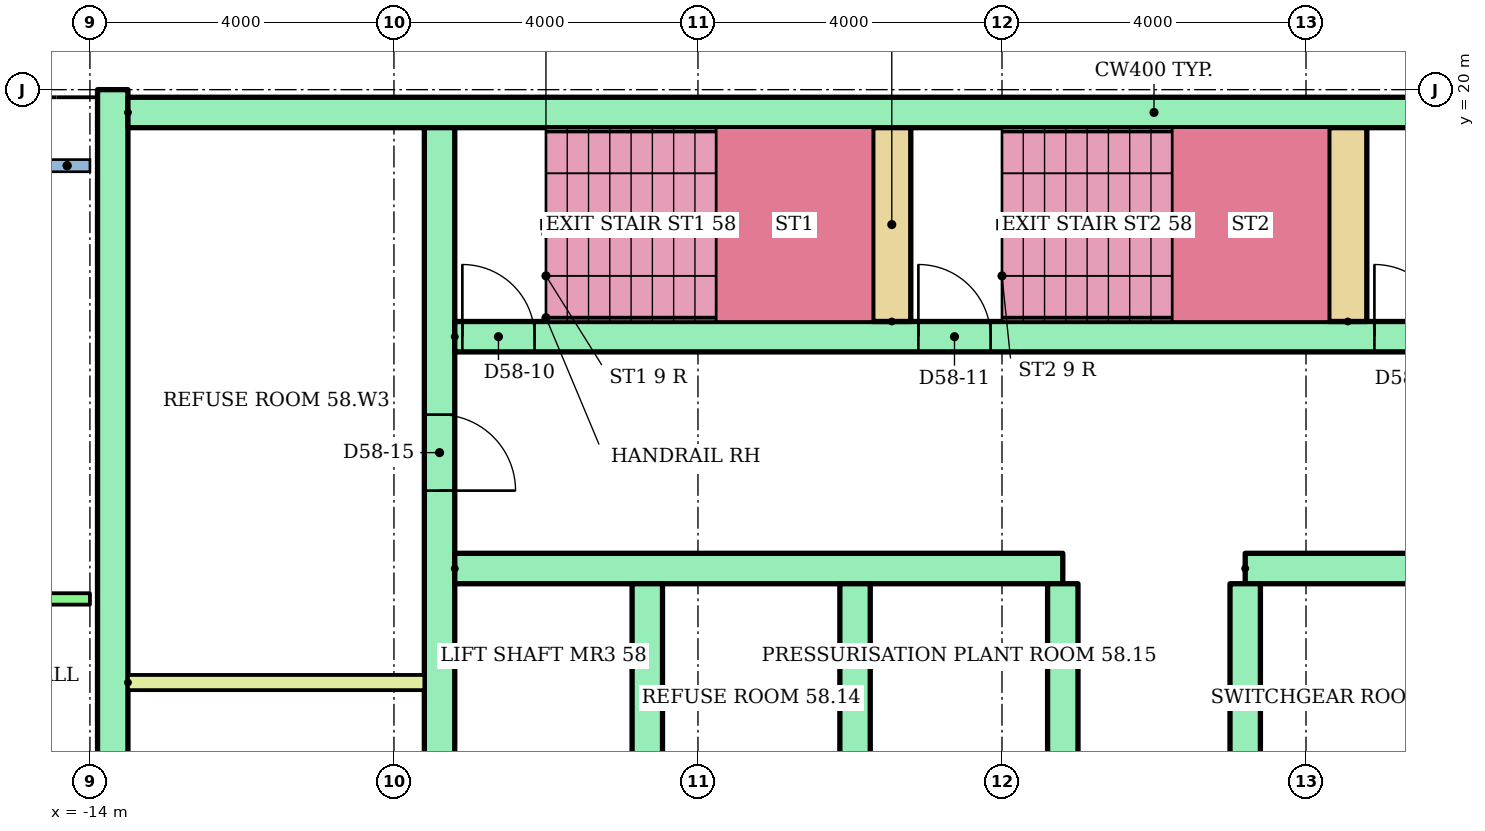
"""IFC4 building model, lengths in metres.
Left out: names, types, materials, properties, quantities, classifications, styles, units other than length and angle.
Written with IfcOpenShell. Run it as: python <this file> out.ifc"""

import sys

from ifc_helpers import new_model, si_unit, direction, frame, frame_2d, origin, place, context, subcontext, project, spatial, rectangle, extrude, element, fill, save


model = new_model("IFC4")
c1 = context("Model", 3, precision=1e-05, world=origin(), true_north=direction((0.0, 1.0)))
c2 = subcontext(c1, "Body", "Model", "MODEL_VIEW")
j1 = project(units=[si_unit("LENGTHUNIT", "METRE"), si_unit("PLANEANGLEUNIT", "RADIAN")], contexts=[c1])
p1 = place(None, origin())
s1 = spatial("IfcSite", under=j1, at=p1, CompositionType="ELEMENT")
p2 = place(p1, origin())
s2 = spatial("IfcBuilding", under=s1, at=p2, CompositionType="ELEMENT")
p3 = place(p2, frame((0.0, 0.0, 223.6)))
s3 = spatial("IfcBuildingStorey", under=s2, at=p3, CompositionType="ELEMENT", Elevation=223.6)
p4 = place(p3, frame((-13.7, 3.0, 0.0), z_axis=(0.0, 0.0, 1.0), x_axis=(0.0, 1.0, 0.0)))
e1 = element("IfcWall", 1, at=p4, inside=s3, PredefinedType="SHEAR", context=c2, shape_type="SweptSolid", body=[
    extrude(rectangle(XDim=17.0, YDim=0.4, at=frame_2d((8.5, 0.0))), origin(), (0.0, 0.0, 1.0), 2.92),
])
p5 = place(p3, frame((-13.5, 19.7, 0.0)))
e2 = element("IfcWall", 2, at=p5, inside=s3, PredefinedType="SHEAR", context=c2, shape_type="SweptSolid", body=[
    extrude(rectangle(XDim=27.0, YDim=0.4, at=frame_2d((13.5, 0.0))), origin(), (0.0, 0.0, 1.0), 2.92),
])
p6 = place(p3, frame((-9.4, 6.8, 0.0), z_axis=(0.0, 0.0, 1.0), x_axis=(0.0, 1.0, 0.0)))
e3 = element("IfcWall", 3, at=p6, inside=s3, PredefinedType="SHEAR", context=c2, shape_type="SweptSolid", body=[
    extrude(rectangle(XDim=12.7, YDim=0.4, at=frame_2d((6.35, 0.0))), origin(), (0.0, 0.0, 1.0), 2.92),
])
p7 = place(p6, frame((0.3, 0.0, 0.0)))
e4 = element("IfcOpeningElement", 4, at=p7, cuts=e3, PredefinedType="OPENING", context=c2, shape_type="SweptSolid", body=[
    extrude(rectangle(XDim=1.0, YDim=2.1, at=frame_2d((0.5, 1.05))), frame((0.0, 0.21, 0.0), z_axis=(0.0, -1.0, 0.0), x_axis=(1.0, 0.0, 0.0)), (0.0, 0.0, 1.0), 0.42),
])
p8 = place(p6, frame((2.05, 0.0, 0.0)))
e5 = element("IfcOpeningElement", 5, at=p8, cuts=e3, PredefinedType="OPENING", context=c2, shape_type="SweptSolid", body=[
    extrude(rectangle(XDim=1.0, YDim=2.1, at=frame_2d((0.5, 1.05))), frame((0.0, 0.21, 0.0), z_axis=(0.0, -1.0, 0.0), x_axis=(1.0, 0.0, 0.0)), (0.0, 0.0, 1.0), 0.42),
])
p9 = place(p6, frame((7.925, 0.0, 0.0)))
e6 = element("IfcOpeningElement", 6, at=p9, cuts=e3, PredefinedType="OPENING", context=c2, shape_type="SweptSolid", body=[
    extrude(rectangle(XDim=1.0, YDim=2.1, at=frame_2d((0.5, 1.05))), frame((0.0, 0.21, 0.0), z_axis=(0.0, -1.0, 0.0), x_axis=(1.0, 0.0, 0.0)), (0.0, 0.0, 1.0), 0.42),
])
for number, where in (
    (7, (-9.2, 13.7, 0.0)),
    (8, (1.2, 13.7, 0.0)),
):
    element("IfcWall", number, at=place(p3, frame(where)), inside=s3, PredefinedType="SHEAR", context=c2, shape_type="SweptSolid", body=[
        extrude(rectangle(XDim=8.0, YDim=0.4, at=frame_2d((4.0, 0.0))), origin(), (0.0, 0.0, 1.0), 2.92),
    ])
for number, where, z_axis, x_axis in (
    (9, (-6.667, 10.5, 0.0), (0.0, 0.0, 1.0), (0.0, 1.0, 0.0)),
    (10, (-3.933, 10.5, 0.0), (0.0, 0.0, 1.0), (0.0, 1.0, 0.0)),
    (11, (-1.2, 10.5, 0.0), (0.0, 0.0, 1.0), (0.0, 1.0, 0.0)),
    (12, (1.2, 10.5, 0.0), (0.0, 0.0, 1.0), (0.0, 1.0, 0.0)),
):
    element("IfcWall", number, at=place(p3, frame(where, z_axis=z_axis, x_axis=x_axis)), inside=s3, PredefinedType="SHEAR", context=c2, shape_type="SweptSolid", body=[
        extrude(rectangle(XDim=3.0, YDim=0.4, at=frame_2d((1.5, 0.0))), origin(), (0.0, 0.0, 1.0), 2.92),
    ])
p10 = place(p3, frame((-9.2, 16.75, 0.0)))
e13 = element("IfcWall", 13, at=p10, inside=s3, PredefinedType="SHEAR", context=c2, shape_type="SweptSolid", body=[
    extrude(rectangle(XDim=18.4, YDim=0.4, at=frame_2d((9.2, 0.0))), origin(), (0.0, 0.0, 1.0), 2.92),
])
p11 = place(p10, frame((0.1, 0.0, 0.0)))
e14 = element("IfcOpeningElement", 14, at=p11, cuts=e13, PredefinedType="OPENING", context=c2, shape_type="SweptSolid", body=[
    extrude(rectangle(XDim=0.95, YDim=2.1, at=frame_2d((0.475, 1.05))), frame((0.0, 0.21, 0.0), z_axis=(0.0, -1.0, 0.0), x_axis=(1.0, 0.0, 0.0)), (0.0, 0.0, 1.0), 0.42),
])
p12 = place(p10, frame((6.1, 0.0, 0.0)))
e15 = element("IfcOpeningElement", 15, at=p12, cuts=e13, PredefinedType="OPENING", context=c2, shape_type="SweptSolid", body=[
    extrude(rectangle(XDim=0.95, YDim=2.1, at=frame_2d((0.475, 1.05))), frame((0.0, 0.21, 0.0), z_axis=(0.0, -1.0, 0.0), x_axis=(1.0, 0.0, 0.0)), (0.0, 0.0, 1.0), 0.42),
])
p13 = place(p10, frame((12.1, 0.0, 0.0)))
e16 = element("IfcOpeningElement", 16, at=p13, cuts=e13, PredefinedType="OPENING", context=c2, shape_type="SweptSolid", body=[
    extrude(rectangle(XDim=0.95, YDim=2.1, at=frame_2d((0.475, 1.05))), frame((0.0, 0.21, 0.0), z_axis=(0.0, -1.0, 0.0), x_axis=(1.0, 0.0, 0.0)), (0.0, 0.0, 1.0), 0.42),
])
for number, where, z_axis, x_axis in (
    (17, (-3.45, 16.95, 0.0), (0.0, 0.0, 1.0), (0.0, 1.0, 0.0)),
    (18, (2.55, 16.95, 0.0), (0.0, 0.0, 1.0), (0.0, 1.0, 0.0)),
):
    element("IfcWall", number, at=place(p3, frame(where, z_axis=z_axis, x_axis=x_axis)), inside=s3, PredefinedType="SHEAR", context=c2, shape_type="SweptSolid", body=[
        extrude(rectangle(XDim=2.55, YDim=0.5, at=frame_2d((1.275, 0.0))), origin(), (0.0, 0.0, 1.0), 2.92),
    ])
p14 = place(p3, frame((-13.5, 12.2, 0.0)))
e19 = element("IfcWall", 19, at=p14, inside=s3, PredefinedType="PARTITIONING", context=c2, shape_type="SweptSolid", body=[
    extrude(rectangle(XDim=3.9, YDim=0.2, at=frame_2d((1.95, 0.0))), origin(), (0.0, 0.0, 1.0), 2.92),
])
p15 = place(p3, frame((-28.92, 13.3, 0.0)))
e20 = element("IfcWall", 20, at=p15, inside=s3, PredefinedType="PARTITIONING", context=c2, shape_type="SweptSolid", body=[
    extrude(rectangle(XDim=14.92, YDim=0.15, at=frame_2d((7.46, 0.0))), origin(), (0.0, 0.0, 1.0), 2.4),
])
p16 = place(p15, frame((1.97, 0.0, 0.0)))
e21 = element("IfcOpeningElement", 21, at=p16, cuts=e20, PredefinedType="OPENING", context=c2, shape_type="SweptSolid", body=[
    extrude(rectangle(XDim=1.0, YDim=2.1, at=frame_2d((0.5, 1.05))), frame((0.0, 0.085, 0.0), z_axis=(0.0, -1.0, 0.0), x_axis=(1.0, 0.0, 0.0)), (0.0, 0.0, 1.0), 0.17),
])
p17 = place(p15, frame((9.32, 0.0, 0.0)))
e22 = element("IfcOpeningElement", 22, at=p17, cuts=e20, PredefinedType="OPENING", context=c2, shape_type="SweptSolid", body=[
    extrude(rectangle(XDim=1.0, YDim=2.1, at=frame_2d((0.5, 1.05))), frame((0.0, 0.085, 0.0), z_axis=(0.0, -1.0, 0.0), x_axis=(1.0, 0.0, 0.0)), (0.0, 0.0, 1.0), 0.17),
])
p18 = place(p11, origin())
e23 = element("IfcDoor", 23, at=p18, inside=s3, OperationType="SINGLE_SWING_LEFT", PredefinedType="DOOR", context=c2, shape_type="SweptSolid", body=[
    extrude(rectangle(XDim=0.95, YDim=2.1, at=frame_2d((0.475, 1.05))), frame((0.0, 0.025, 0.0), z_axis=(0.0, -1.0, 0.0), x_axis=(1.0, 0.0, 0.0)), (0.0, 0.0, 1.0), 0.05),
])
fill(e14, e23)
p19 = place(p12, origin())
e24 = element("IfcDoor", 24, at=p19, inside=s3, OperationType="SINGLE_SWING_LEFT", PredefinedType="DOOR", context=c2, shape_type="SweptSolid", body=[
    extrude(rectangle(XDim=0.95, YDim=2.1, at=frame_2d((0.475, 1.05))), frame((0.0, 0.025, 0.0), z_axis=(0.0, -1.0, 0.0), x_axis=(1.0, 0.0, 0.0)), (0.0, 0.0, 1.0), 0.05),
])
fill(e15, e24)
p20 = place(p13, origin())
e25 = element("IfcDoor", 25, at=p20, inside=s3, OperationType="SINGLE_SWING_LEFT", PredefinedType="DOOR", context=c2, shape_type="SweptSolid", body=[
    extrude(rectangle(XDim=0.95, YDim=2.1, at=frame_2d((0.475, 1.05))), frame((0.0, 0.025, 0.0), z_axis=(0.0, -1.0, 0.0), x_axis=(1.0, 0.0, 0.0)), (0.0, 0.0, 1.0), 0.05),
])
fill(e16, e25)
p21 = place(p9, frame((1.0, 0.0, 0.0), z_axis=(0.0, 0.0, 1.0), x_axis=(-1.0, 0.0, 0.0)))
e26 = element("IfcDoor", 26, at=p21, inside=s3, OperationType="SINGLE_SWING_LEFT", PredefinedType="DOOR", context=c2, shape_type="SweptSolid", body=[
    extrude(rectangle(XDim=1.0, YDim=2.1, at=frame_2d((0.5, 1.05))), frame((0.0, 0.025, 0.0), z_axis=(0.0, -1.0, 0.0), x_axis=(1.0, 0.0, 0.0)), (0.0, 0.0, 1.0), 0.05),
])
fill(e6, e26)
save(model, sys.argv[1])
